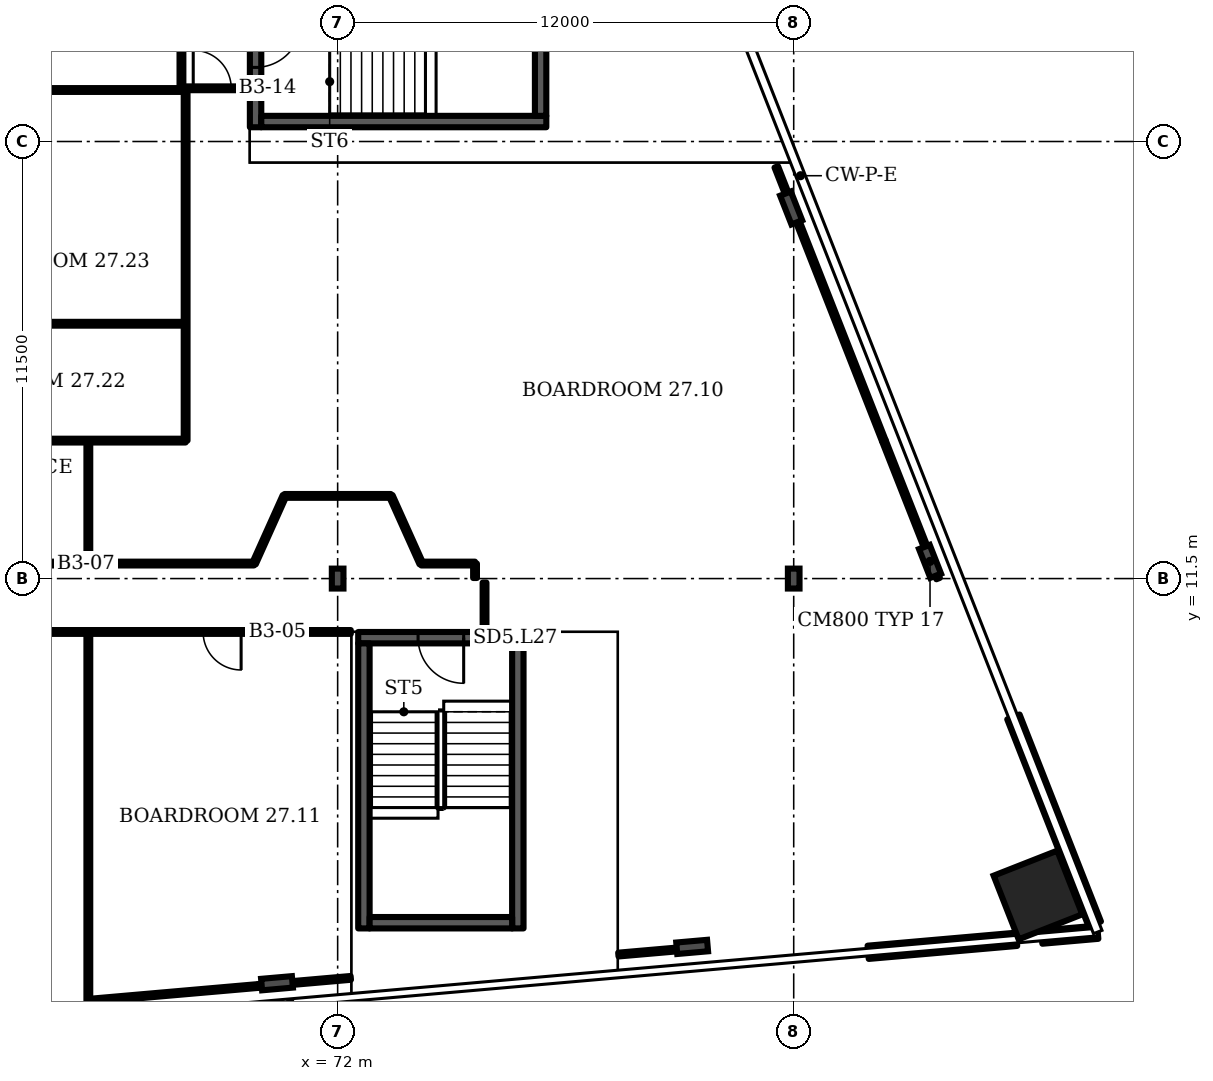
"""IFC4 building model, lengths in metres.
Left out: names, types, materials, properties, quantities, classifications, styles, units other than length and angle.
Written with IfcOpenShell. Run it as: python <this file> out.ifc"""

import sys

from ifc_helpers import new_model, si_unit, direction, frame, frame_2d, origin, origin_2d, place, context, subcontext, project, spatial, rectangle, i_section, extrude, element, fill, save


model = new_model("IFC4")
c1 = context("Model", 3, precision=1e-05, world=origin(), true_north=direction((0.0, 1.0)))
c2 = subcontext(c1, "Body", "Model", "MODEL_VIEW")
j1 = project(units=[si_unit("LENGTHUNIT", "METRE"), si_unit("PLANEANGLEUNIT", "RADIAN")], contexts=[c1])
p1 = place(None, origin())
s1 = spatial("IfcSite", under=j1, at=p1, CompositionType="ELEMENT")
p2 = place(p1, origin())
s2 = spatial("IfcBuilding", under=s1, at=p2, CompositionType="ELEMENT")
p3 = place(p2, frame((0.0, 0.0, 118.3)))
s3 = spatial("IfcBuildingStorey", under=s2, at=p3, CompositionType="ELEMENT", Elevation=118.3)
p4 = place(p3, frame((90.427, 3.174, 0.0), z_axis=(0.0, 0.0, 1.0), x_axis=(-0.365778, 0.930702, 0.0)))
e1 = element("IfcColumn", 1, at=p4, inside=s3, PredefinedType="COLUMN", context=c2, shape_type="SweptSolid", body=[
    extrude(rectangle(XDim=1.8, YDim=1.8, at=origin_2d()), origin(), (0.0, 0.0, 1.0), 3.6),
])
for number, where, z_axis, x_axis in (
    (2, (70.404, 0.853, 0.0), (0.0, 0.0, 1.0), (0.087, -0.996, 0.0)),
    (3, (81.328, 1.808, 0.0), (0.0, 0.0, 1.0), (0.087, -0.996, 0.0)),
    (4, (87.587, 11.952, 0.0), (0.0, 0.0, 1.0), (0.931, 0.366, 0.0)),
    (5, (83.933, 21.251, 0.0), (0.0, 0.0, 1.0), (0.931, 0.366, 0.0)),
):
    element("IfcColumn", number, at=place(p3, frame(where, z_axis=z_axis, x_axis=x_axis)), inside=s3, PredefinedType="COLUMN", context=c2, shape_type="SweptSolid", body=[
        extrude(i_section(OverallWidth=0.303, OverallDepth=0.814, WebThickness=0.021, FlangeThickness=0.04, FilletRadius=0.03, at=origin_2d()), origin(), (0.0, 0.0, 1.0), 3.6),
    ])
for number, where, z_axis, x_axis in (
    (6, (72.0, 11.5, 0.0), (0.0, 0.0, 1.0), (1.0, 0.0, 0.0)),
    (7, (84.0, 11.5, 0.0), (0.0, 0.0, 1.0), (1.0, 0.0, 0.0)),
):
    element("IfcColumn", number, at=place(p3, frame(where, z_axis=z_axis, x_axis=x_axis)), inside=s3, PredefinedType="COLUMN", context=c2, shape_type="SweptSolid", body=[
        extrude(i_section(OverallWidth=0.306, OverallDepth=0.524, WebThickness=0.021, FlangeThickness=0.04, FilletRadius=0.027, at=origin_2d()), origin(), (0.0, 0.0, 1.0), 3.6),
    ])
p5 = place(p3, frame((85.959, 1.667, 0.0), z_axis=(0.0, 0.0, 1.0), x_axis=(0.996194, 0.087167, 0.0)))
e8 = element("IfcWall", 8, at=p5, inside=s3, PredefinedType="SOLIDWALL", context=c2, shape_type="SweptSolid", body=[
    extrude(rectangle(XDim=3.921, YDim=0.35, at=frame_2d((1.96, 0.0))), origin(), (0.0, 0.0, 1.0), 1.0),
])
p6 = place(p3, frame((90.527, 2.066, 0.0), z_axis=(0.0, 0.0, 1.0), x_axis=(0.996198, 0.087157, 0.0)))
e9 = element("IfcWall", 9, at=p6, inside=s3, PredefinedType="SOLIDWALL", context=c2, shape_type="SweptSolid", body=[
    extrude(rectangle(XDim=1.479, YDim=0.35, at=frame_2d((0.74, 0.0))), origin(), (0.0, 0.0, 1.0), 1.0),
])
p7 = place(p3, frame((91.921, 2.414, 0.0), z_axis=(0.0, 0.0, 1.0), x_axis=(-0.36578, 0.930701, 0.0)))
e10 = element("IfcWall", 10, at=p7, inside=s3, PredefinedType="SOLIDWALL", context=c2, shape_type="SweptSolid", body=[
    extrude(rectangle(XDim=5.852, YDim=0.35, at=frame_2d((2.926, 0.0))), origin(), (0.0, 0.0, 1.0), 1.0),
])
p8 = place(p3, frame((72.541, 9.945, 0.0), z_axis=(0.0, 0.0, 1.0), x_axis=(1.0, 0.0, 0.0)))
e11 = element("IfcWall", 11, at=p8, inside=s3, PredefinedType="SHEAR", context=c2, shape_type="SweptSolid", body=[
    extrude(rectangle(XDim=4.35, YDim=0.3, at=frame_2d((2.175, 0.0))), origin(), (0.0, 0.0, 1.0), 3.2),
])
p9 = place(p8, frame((1.575, 0.0, 0.0)))
e12 = element("IfcOpeningElement", 12, at=p9, cuts=e11, PredefinedType="OPENING", context=c2, shape_type="SweptSolid", body=[
    extrude(rectangle(XDim=1.2, YDim=2.1, at=frame_2d((0.6, 1.05))), frame((0.0, 0.16, 0.0), z_axis=(0.0, -1.0, 0.0), x_axis=(1.0, 0.0, 0.0)), (0.0, 0.0, 1.0), 0.32),
])
p10 = place(p3, frame((69.84, 23.375, 0.0), z_axis=(0.0, 0.0, 1.0), x_axis=(0.0, 1.0, 0.0)))
e13 = element("IfcWall", 13, at=p10, inside=s3, PredefinedType="SHEAR", context=c2, shape_type="SweptSolid", body=[
    extrude(rectangle(XDim=4.35, YDim=0.3, at=frame_2d((2.175, 0.0))), origin(), (0.0, 0.0, 1.0), 3.2),
])
p11 = place(p10, frame((1.575, 0.0, 0.0)))
e14 = element("IfcOpeningElement", 14, at=p11, cuts=e13, PredefinedType="OPENING", context=c2, shape_type="SweptSolid", body=[
    extrude(rectangle(XDim=1.2, YDim=2.1, at=frame_2d((0.6, 1.05))), frame((0.0, 0.16, 0.0), z_axis=(0.0, -1.0, 0.0), x_axis=(1.0, 0.0, 0.0)), (0.0, 0.0, 1.0), 0.32),
])
for number, where, z_axis, x_axis in (
    (15, (59.4, 15.13, 0.0), (0.0, 0.0, 1.0), (1.0, 0.0, 0.0)),
    (16, (59.4, 18.205, 0.0), (0.0, 0.0, 1.0), (1.0, 0.0, 0.0)),
    (17, (59.4, 24.355, 0.0), (0.0, 0.0, 1.0), (1.0, 0.0, 0.0)),
):
    element("IfcWall", number, at=place(p3, frame(where, z_axis=z_axis, x_axis=x_axis)), inside=s3, PredefinedType="PARTITIONING", context=c2, shape_type="SweptSolid", body=[
        extrude(rectangle(XDim=8.6, YDim=0.1, at=frame_2d((4.3, 0.0))), origin(), (0.0, 0.0, 1.0), 3.2),
    ])
p12 = place(p3, frame((62.2, 10.095, 0.0), z_axis=(0.0, 0.0, 1.0), x_axis=(1.0, 0.0, 0.0)))
e18 = element("IfcWall", 18, at=p12, inside=s3, PredefinedType="PARTITIONING", context=c2, shape_type="SweptSolid", body=[
    extrude(rectangle(XDim=10.146, YDim=0.1, at=frame_2d((5.073, 0.0))), origin(), (0.0, 0.0, 1.0), 3.2),
])
p13 = place(p12, frame((6.26, 0.0, 0.0)))
e19 = element("IfcOpeningElement", 19, at=p13, cuts=e18, PredefinedType="OPENING", context=c2, shape_type="SweptSolid", body=[
    extrude(rectangle(XDim=1.0, YDim=2.1, at=frame_2d((0.5, 1.05))), frame((0.0, 0.06, 0.0), z_axis=(0.0, -1.0, 0.0), x_axis=(1.0, 0.0, 0.0)), (0.0, 0.0, 1.0), 0.12),
])
p14 = place(p3, frame((62.2, 11.895, 0.0), z_axis=(0.0, 0.0, 1.0), x_axis=(1.0, 0.0, 0.0)))
e20 = element("IfcWall", 20, at=p14, inside=s3, PredefinedType="PARTITIONING", context=c2, shape_type="SweptSolid", body=[
    extrude(rectangle(XDim=7.6, YDim=0.1, at=frame_2d((3.8, 0.0))), origin(), (0.0, 0.0, 1.0), 3.2),
])
p15 = place(p14, frame((1.22, 0.0, 0.0)))
e21 = element("IfcOpeningElement", 21, at=p15, cuts=e20, PredefinedType="OPENING", context=c2, shape_type="SweptSolid", body=[
    extrude(rectangle(XDim=1.0, YDim=2.1, at=frame_2d((0.5, 1.05))), frame((0.0, 0.06, 0.0), z_axis=(0.0, -1.0, 0.0), x_axis=(1.0, 0.0, 0.0)), (0.0, 0.0, 1.0), 0.12),
])
p16 = place(p3, frame((65.44, 0.39, 0.0), z_axis=(0.0, 0.0, 1.0), x_axis=(0.996214, 0.086949, 0.0)))
e22 = element("IfcWall", 22, at=p16, inside=s3, PredefinedType="PARTITIONING", context=c2, shape_type="SweptSolid", body=[
    extrude(rectangle(XDim=4.487, YDim=0.1, at=frame_2d((2.244, 0.0))), origin(), (0.0, 0.0, 1.0), 2.58),
])
p17 = place(p3, frame((65.44, 0.39, 0.0), z_axis=(0.0, 0.0, 1.0), x_axis=(0.0, 1.0, 0.0)))
e23 = element("IfcWall", 23, at=p17, inside=s3, PredefinedType="PARTITIONING", context=c2, shape_type="SweptSolid", body=[
    extrude(rectangle(XDim=9.705, YDim=0.1, at=frame_2d((4.853, 0.0))), origin(), (0.0, 0.0, 1.0), 3.2),
])
p18 = place(p3, frame((65.44, 11.895, 0.0), z_axis=(0.0, 0.0, 1.0), x_axis=(0.0, 1.0, 0.0)))
e24 = element("IfcWall", 24, at=p18, inside=s3, PredefinedType="PARTITIONING", context=c2, shape_type="SweptSolid", body=[
    extrude(rectangle(XDim=3.235, YDim=0.1, at=frame_2d((1.617, 0.0))), origin(), (0.0, 0.0, 1.0), 3.2),
])
p19 = place(p3, frame((67.89, 24.4, 0.0), z_axis=(0.0, 0.0, 1.0), x_axis=(0.0, 1.0, 0.0)))
e25 = element("IfcWall", 25, at=p19, inside=s3, PredefinedType="PARTITIONING", context=c2, shape_type="SweptSolid", body=[
    extrude(rectangle(XDim=4.485, YDim=0.1, at=frame_2d((2.243, 0.0))), origin(), (0.0, 0.0, 1.0), 3.2),
])
p20 = place(p3, frame((68.0, 24.4, 0.0), z_axis=(0.0, 0.0, 1.0), x_axis=(1.0, 0.0, 0.0)))
e26 = element("IfcWall", 26, at=p20, inside=s3, PredefinedType="PARTITIONING", context=c2, shape_type="SweptSolid", body=[
    extrude(rectangle(XDim=1.67, YDim=0.1, at=frame_2d((0.835, 0.0))), origin(), (0.0, 0.0, 1.0), 3.2),
])
p21 = place(p20, frame((0.2, 0.0, 0.0)))
e27 = element("IfcOpeningElement", 27, at=p21, cuts=e26, PredefinedType="OPENING", context=c2, shape_type="SweptSolid", body=[
    extrude(rectangle(XDim=1.0, YDim=2.1, at=frame_2d((0.5, 1.05))), frame((0.0, 0.06, 0.0), z_axis=(0.0, -1.0, 0.0), x_axis=(1.0, 0.0, 0.0)), (0.0, 0.0, 1.0), 0.12),
])
p22 = place(p3, frame((68.0, 15.13, 0.0), z_axis=(0.0, 0.0, 1.0), x_axis=(0.0, 1.0, 0.0)))
e28 = element("IfcWall", 28, at=p22, inside=s3, PredefinedType="PARTITIONING", context=c2, shape_type="SweptSolid", body=[
    extrude(rectangle(XDim=9.22, YDim=0.1, at=frame_2d((4.61, 0.0))), origin(), (0.0, 0.0, 1.0), 3.2),
])
p23 = place(p3, frame((69.8, 11.895, 0.0), z_axis=(0.0, 0.0, 1.0), x_axis=(0.409954, 0.912107, 0.0)))
e29 = element("IfcWall", 29, at=p23, inside=s3, PredefinedType="PARTITIONING", context=c2, shape_type="SweptSolid", body=[
    extrude(rectangle(XDim=1.952, YDim=0.1, at=frame_2d((0.976, 0.0))), origin(), (0.0, 0.0, 1.0), 3.2),
])
p24 = place(p3, frame((69.91, 0.78, 0.0), z_axis=(0.0, 0.0, 1.0), x_axis=(0.99619, 0.087259, 0.0)))
e30 = element("IfcWall", 30, at=p24, inside=s3, PredefinedType="PARTITIONING", context=c2, shape_type="SweptSolid", body=[
    extrude(rectangle(XDim=2.445, YDim=0.1, at=frame_2d((1.223, 0.0))), origin(), (0.0, 0.0, 1.0), 2.58),
])
p25 = place(p3, frame((70.6, 13.675, 0.0), z_axis=(0.0, 0.0, 1.0), x_axis=(1.0, 0.0, 0.0)))
e31 = element("IfcWall", 31, at=p25, inside=s3, PredefinedType="PARTITIONING", context=c2, shape_type="SweptSolid", body=[
    extrude(rectangle(XDim=2.8, YDim=0.1, at=frame_2d((1.4, 0.0))), origin(), (0.0, 0.0, 1.0), 3.2),
])
p26 = place(p3, frame((74.2, 11.895, 0.0), z_axis=(0.0, 0.0, 1.0), x_axis=(1.0, 0.0, 0.0)))
e32 = element("IfcWall", 32, at=p26, inside=s3, PredefinedType="PARTITIONING", context=c2, shape_type="SweptSolid", body=[
    extrude(rectangle(XDim=1.415, YDim=0.1, at=frame_2d((0.708, 0.0))), origin(), (0.0, 0.0, 1.0), 3.2),
])
p27 = place(p3, frame((74.2, 11.895, 0.0), z_axis=(0.0, 0.0, 1.0), x_axis=(-0.409954, 0.912107, 0.0)))
e33 = element("IfcWall", 33, at=p27, inside=s3, PredefinedType="PARTITIONING", context=c2, shape_type="SweptSolid", body=[
    extrude(rectangle(XDim=1.952, YDim=0.1, at=frame_2d((0.976, 0.0))), origin(), (0.0, 0.0, 1.0), 3.2),
])
p28 = place(p3, frame((75.615, 11.515, 0.0), z_axis=(0.0, 0.0, 1.0), x_axis=(0.0, 1.0, 0.0)))
e34 = element("IfcWall", 34, at=p28, inside=s3, PredefinedType="PARTITIONING", context=c2, shape_type="SweptSolid", body=[
    extrude(rectangle(XDim=0.38, YDim=0.1, at=frame_2d((0.19, 0.0))), origin(), (0.0, 0.0, 1.0), 3.2),
])
p29 = place(p3, frame((75.865, 10.115, 0.0), z_axis=(0.0, 0.0, 1.0), x_axis=(0.0, 1.0, 0.0)))
e35 = element("IfcWall", 35, at=p29, inside=s3, PredefinedType="PARTITIONING", context=c2, shape_type="SweptSolid", body=[
    extrude(rectangle(XDim=1.28, YDim=0.1, at=frame_2d((0.64, 0.0))), origin(), (0.0, 0.0, 1.0), 3.2),
])
p30 = place(p3, frame((79.386, 1.607, 0.0), z_axis=(0.0, 0.0, 1.0), x_axis=(0.996228, 0.08682, 0.0)))
e36 = element("IfcWall", 36, at=p30, inside=s3, PredefinedType="PARTITIONING", context=c2, shape_type="SweptSolid", body=[
    extrude(rectangle(XDim=1.997, YDim=0.1, at=frame_2d((0.998, 0.0))), origin(), (0.0, 0.0, 1.0), 2.58),
])
p31 = place(p3, frame((86.37, 15.13, 0.0), z_axis=(0.0, 0.0, 1.0), x_axis=(-0.365535, 0.930794, 0.0)))
e37 = element("IfcWall", 37, at=p31, inside=s3, PredefinedType="PARTITIONING", context=c2, shape_type="SweptSolid", body=[
    extrude(rectangle(XDim=7.739, YDim=0.1, at=frame_2d((3.87, 0.0))), origin(), (0.0, 0.0, 1.0), 2.58),
])
p32 = place(p3, frame((87.8, 11.5, 0.0), z_axis=(0.0, 0.0, 1.0), x_axis=(-0.366521, 0.930414, 0.0)))
e38 = element("IfcWall", 38, at=p32, inside=s3, PredefinedType="PARTITIONING", context=c2, shape_type="SweptSolid", body=[
    extrude(rectangle(XDim=3.901, YDim=0.1, at=frame_2d((1.951, 0.0))), origin(), (0.0, 0.0, 1.0), 2.58),
])
for number, where, z_axis, x_axis in (
    (39, (72.691, 2.295, 0.0), (0.0, 0.0, 1.0), (0.0, 1.0, 0.0)),
    (40, (76.741, 2.295, 0.0), (0.0, 0.0, 1.0), (0.0, 1.0, 0.0)),
):
    element("IfcWall", number, at=place(p3, frame(where, z_axis=z_axis, x_axis=x_axis)), inside=s3, PredefinedType="SHEAR", context=c2, shape_type="SweptSolid", body=[
        extrude(rectangle(XDim=7.5, YDim=0.3, at=frame_2d((3.75, 0.0))), origin(), (0.0, 0.0, 1.0), 3.2),
    ])
p33 = place(p3, frame((72.841, 2.445, 0.0), z_axis=(0.0, 0.0, 1.0), x_axis=(1.0, 0.0, 0.0)))
e41 = element("IfcWall", 41, at=p33, inside=s3, PredefinedType="SHEAR", context=c2, shape_type="SweptSolid", body=[
    extrude(rectangle(XDim=3.75, YDim=0.3, at=frame_2d((1.875, 0.0))), origin(), (0.0, 0.0, 1.0), 3.2),
])
p34 = place(p3, frame((69.99, 23.525, 0.0), z_axis=(0.0, 0.0, 1.0), x_axis=(1.0, 0.0, 0.0)))
e42 = element("IfcWall", 42, at=p34, inside=s3, PredefinedType="SHEAR", context=c2, shape_type="SweptSolid", body=[
    extrude(rectangle(XDim=7.5, YDim=0.3, at=frame_2d((3.75, 0.0))), origin(), (0.0, 0.0, 1.0), 3.2),
])
p35 = place(p3, frame((77.34, 23.675, 0.0), z_axis=(0.0, 0.0, 1.0), x_axis=(0.0, 1.0, 0.0)))
e43 = element("IfcWall", 43, at=p35, inside=s3, PredefinedType="SHEAR", context=c2, shape_type="SweptSolid", body=[
    extrude(rectangle(XDim=3.75, YDim=0.3, at=frame_2d((1.875, 0.0))), origin(), (0.0, 0.0, 1.0), 3.2),
])
p36 = place(p9, origin())
e44 = element("IfcDoor", 44, at=p36, inside=s3, OperationType="SINGLE_SWING_RIGHT", PredefinedType="DOOR", context=c2, shape_type="SweptSolid", body=[
    extrude(rectangle(XDim=1.2, YDim=2.1, at=frame_2d((0.6, 1.05))), frame((0.0, 0.025, 0.0), z_axis=(0.0, -1.0, 0.0), x_axis=(1.0, 0.0, 0.0)), (0.0, 0.0, 1.0), 0.05),
])
fill(e12, e44)
p37 = place(p11, origin())
e45 = element("IfcDoor", 45, at=p37, inside=s3, OperationType="SINGLE_SWING_RIGHT", PredefinedType="DOOR", context=c2, shape_type="SweptSolid", body=[
    extrude(rectangle(XDim=1.2, YDim=2.1, at=frame_2d((0.6, 1.05))), frame((0.0, 0.025, 0.0), z_axis=(0.0, -1.0, 0.0), x_axis=(1.0, 0.0, 0.0)), (0.0, 0.0, 1.0), 0.05),
])
fill(e14, e45)
p38 = place(p13, origin())
e46 = element("IfcDoor", 46, at=p38, inside=s3, OperationType="SINGLE_SWING_RIGHT", PredefinedType="DOOR", context=c2, shape_type="SweptSolid", body=[
    extrude(rectangle(XDim=1.0, YDim=2.1, at=frame_2d((0.5, 1.05))), frame((0.0, 0.025, 0.0), z_axis=(0.0, -1.0, 0.0), x_axis=(1.0, 0.0, 0.0)), (0.0, 0.0, 1.0), 0.05),
])
fill(e19, e46)
p39 = place(p21, origin())
e47 = element("IfcDoor", 47, at=p39, inside=s3, OperationType="SINGLE_SWING_LEFT", PredefinedType="DOOR", context=c2, shape_type="SweptSolid", body=[
    extrude(rectangle(XDim=1.0, YDim=2.1, at=frame_2d((0.5, 1.05))), frame((0.0, 0.025, 0.0), z_axis=(0.0, -1.0, 0.0), x_axis=(1.0, 0.0, 0.0)), (0.0, 0.0, 1.0), 0.05),
])
fill(e27, e47)
save(model, sys.argv[1])
